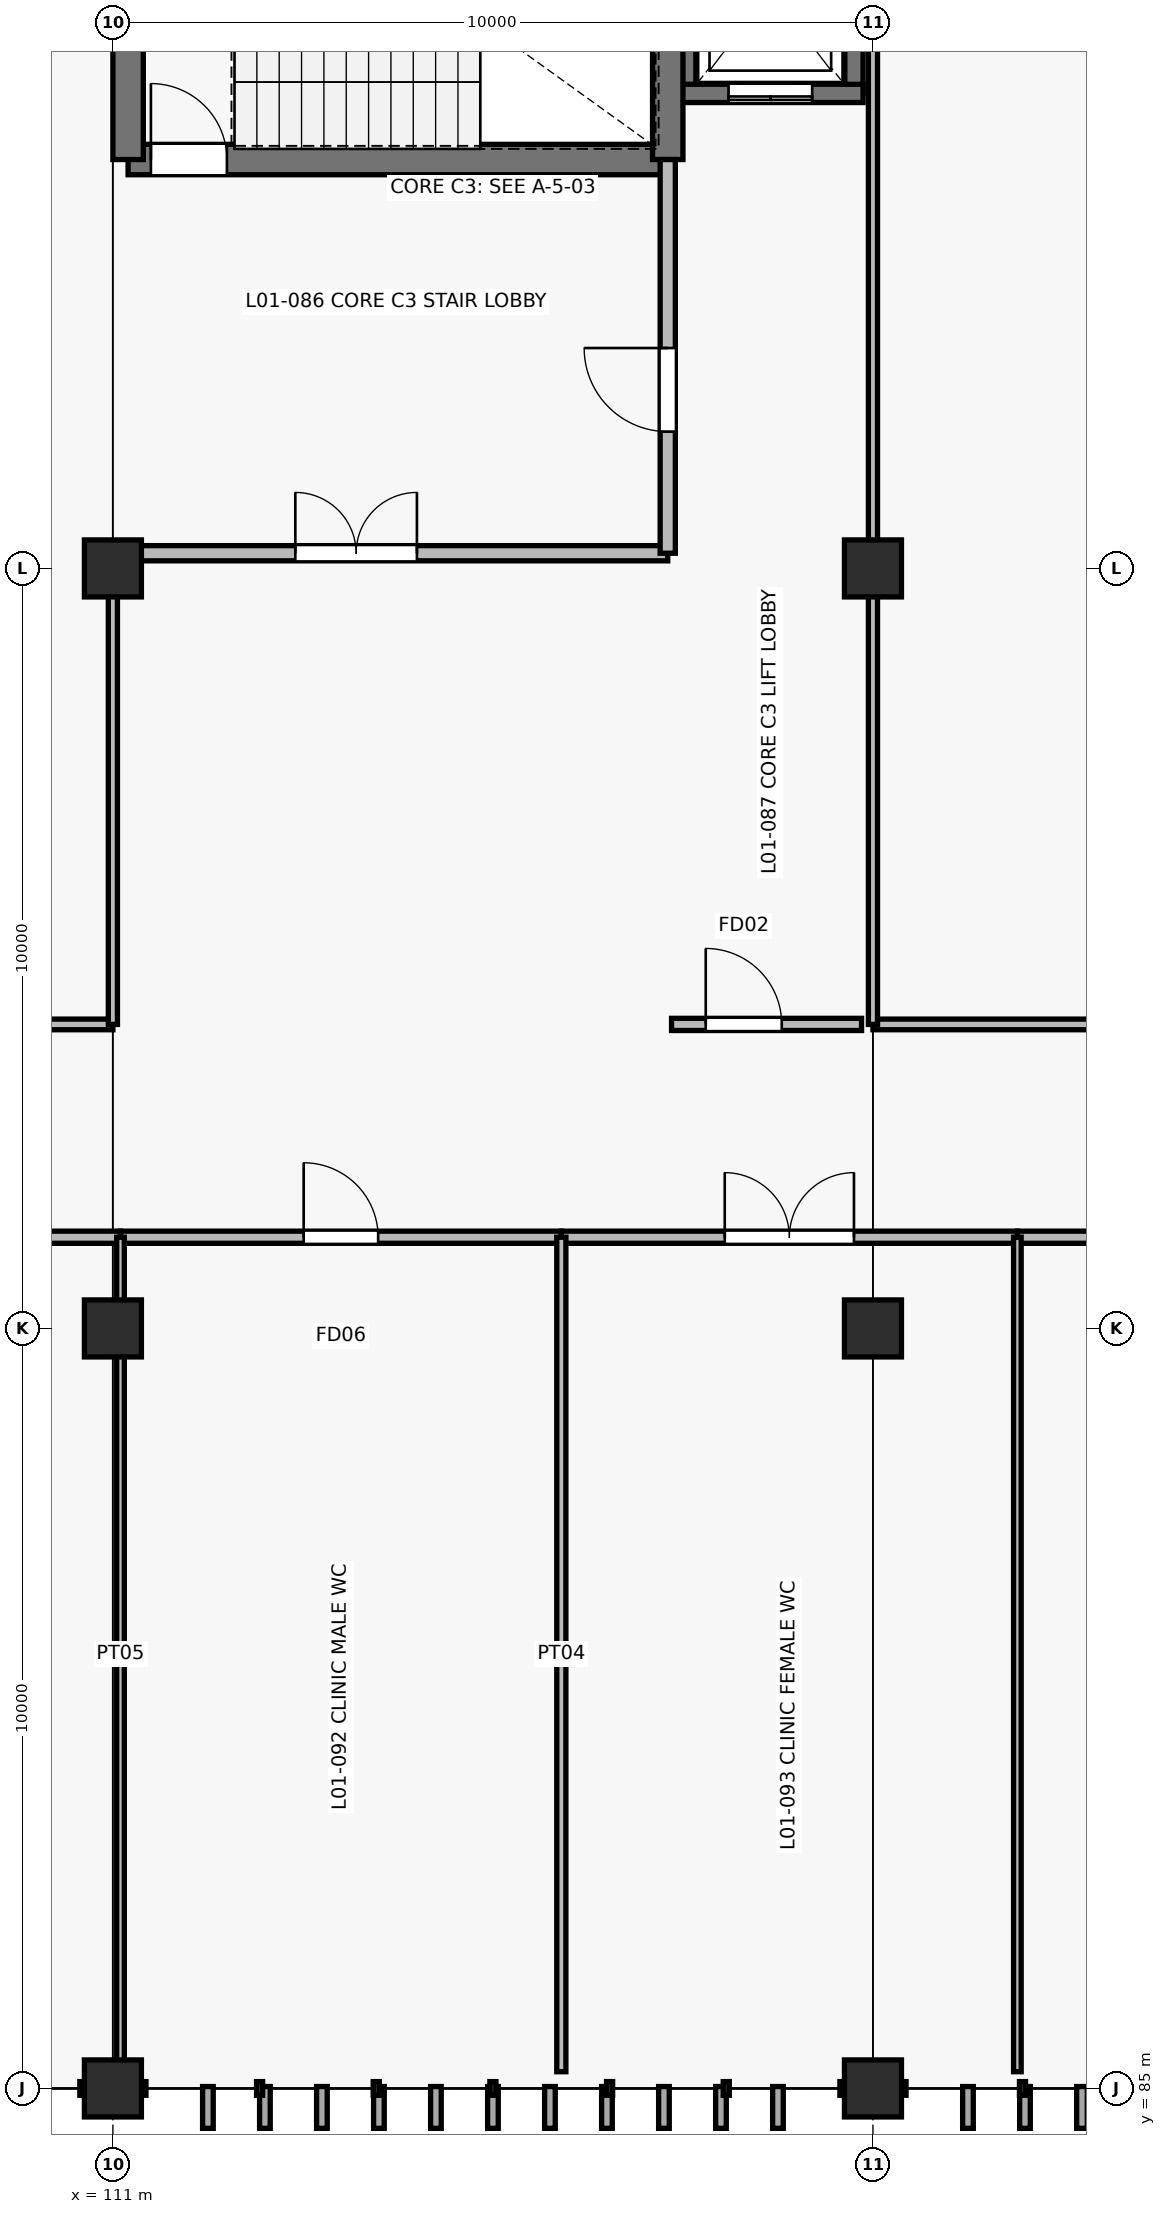
"""IFC4 building model, lengths in metres.
Left out: names, types, materials, properties, quantities, classifications, styles, units other than length and angle.
Written with IfcOpenShell. Run it as: python <this file> out.ifc"""

import sys

from ifc_helpers import new_model, si_unit, direction, frame, frame_2d, origin, origin_2d, place, context, subcontext, project, spatial, rectangle, extrude, element, fill, save


model = new_model("IFC4")
c1 = context("Model", 3, precision=1e-05, world=origin(), true_north=direction((0.0, 1.0)))
c2 = subcontext(c1, "Body", "Model", "MODEL_VIEW")
j1 = project(units=[si_unit("LENGTHUNIT", "METRE"), si_unit("PLANEANGLEUNIT", "RADIAN")], contexts=[c1])
p1 = place(None, origin())
s1 = spatial("IfcSite", under=j1, at=p1, CompositionType="ELEMENT")
p2 = place(p1, origin())
s2 = spatial("IfcBuilding", under=s1, at=p2, CompositionType="ELEMENT")
p3 = place(p2, frame((0.0, 0.0, 4.8)))
s3 = spatial("IfcBuildingStorey", under=s2, at=p3, CompositionType="ELEMENT", Elevation=4.8)
for number, where, z_axis, x_axis in (
    (1, (111.0, 85.0, 0.0), (0.0, 0.0, 1.0), (1.0, 0.0, 0.0)),
    (2, (111.0, 95.0, 0.0), (0.0, 0.0, 1.0), (1.0, 0.0, 0.0)),
    (3, (111.0, 105.0, 0.0), (0.0, 0.0, 1.0), (1.0, 0.0, 0.0)),
    (4, (121.0, 85.0, 0.0), (0.0, 0.0, 1.0), (1.0, 0.0, 0.0)),
    (5, (121.0, 95.0, 0.0), (0.0, 0.0, 1.0), (1.0, 0.0, 0.0)),
    (6, (121.0, 105.0, 0.0), (0.0, 0.0, 1.0), (1.0, 0.0, 0.0)),
):
    element("IfcColumn", number, at=place(p3, frame(where, z_axis=z_axis, x_axis=x_axis)), inside=s3, PredefinedType="COLUMN", context=c2, shape_type="SweptSolid", body=[
        extrude(rectangle(XDim=0.75, YDim=0.75, at=origin_2d()), origin(), (0.0, 0.0, 1.0), 4.2),
    ])
for number, where, z_axis, x_axis in (
    (7, (118.55, 111.25, 0.0), (0.0, 0.0, 1.0), (0.0, 1.0, 0.0)),
    (8, (120.75, 113.95, 0.0), (0.0, 0.0, 1.0), (0.0, -1.0, 0.0)),
):
    element("IfcWall", number, at=place(p3, frame(where, z_axis=z_axis, x_axis=x_axis)), inside=s3, PredefinedType="SHEAR", context=c2, shape_type="SweptSolid", body=[
        extrude(rectangle(XDim=2.7, YDim=0.24, at=frame_2d((1.35, 0.0))), origin(), (0.0, 0.0, 1.0), 4.2),
    ])
p4 = place(p3, frame((120.87, 111.25, 0.0), z_axis=(0.0, 0.0, 1.0), x_axis=(-1.0, 0.0, 0.0)))
e9 = element("IfcWall", 9, at=p4, inside=s3, PredefinedType="SHEAR", context=c2, shape_type="SweptSolid", body=[
    extrude(rectangle(XDim=2.44, YDim=0.24, at=frame_2d((1.22, 0.0))), origin(), (0.0, 0.0, 1.0), 4.2),
])
p5 = place(p4, frame((0.67, 0.0, 0.0)))
e10 = element("IfcOpeningElement", 10, at=p5, cuts=e9, PredefinedType="OPENING", context=c2, shape_type="SweptSolid", body=[
    extrude(rectangle(XDim=1.1, YDim=2.15, at=frame_2d((0.55, 1.075))), frame((0.0, 0.13, 0.0), z_axis=(0.0, -1.0, 0.0), x_axis=(1.0, 0.0, 0.0)), (0.0, 0.0, 1.0), 0.26),
])
p6 = place(p3, frame((111.2, 110.38, 0.0), z_axis=(0.0, 0.0, 1.0), x_axis=(1.0, 0.0, 0.0)))
e11 = element("IfcWall", 11, at=p6, inside=s3, PredefinedType="SHEAR", context=c2, shape_type="SweptSolid", body=[
    extrude(rectangle(XDim=7.1, YDim=0.4, at=frame_2d((3.55, 0.0))), origin(), (0.0, 0.0, 1.0), 4.2),
])
p7 = place(p6, frame((0.3, 0.0, 0.0)))
e12 = element("IfcOpeningElement", 12, at=p7, cuts=e11, PredefinedType="OPENING", context=c2, shape_type="SweptSolid", body=[
    extrude(rectangle(XDim=1.0, YDim=2.15, at=frame_2d((0.5, 1.075))), frame((0.0, 0.21, 0.0), z_axis=(0.0, -1.0, 0.0), x_axis=(1.0, 0.0, 0.0)), (0.0, 0.0, 1.0), 0.42),
])
for number, where, z_axis, x_axis in (
    (13, (118.3, 110.38, 0.0), (0.0, 0.0, 1.0), (0.0, 1.0, 0.0)),
    (14, (111.2, 114.62, 0.0), (0.0, 0.0, 1.0), (0.0, -1.0, 0.0)),
):
    element("IfcWall", number, at=place(p3, frame(where, z_axis=z_axis, x_axis=x_axis)), inside=s3, PredefinedType="SHEAR", context=c2, shape_type="SweptSolid", body=[
        extrude(rectangle(XDim=4.24, YDim=0.4, at=frame_2d((2.12, 0.0))), origin(), (0.0, 0.0, 1.0), 4.2),
    ])
p8 = place(p3, frame((111.2, 105.2, 0.0), z_axis=(0.0, 0.0, 1.0), x_axis=(1.0, 0.0, 0.0)))
e15 = element("IfcWall", 15, at=p8, inside=s3, PredefinedType="PARTITIONING", context=c2, shape_type="SweptSolid", body=[
    extrude(rectangle(XDim=7.1, YDim=0.2, at=frame_2d((3.55, 0.0))), origin(), (0.0, 0.0, 1.0), 2.925),
])
p9 = place(p8, frame((2.2, 0.0, 0.0)))
e16 = element("IfcOpeningElement", 16, at=p9, cuts=e15, PredefinedType="OPENING", context=c2, shape_type="SweptSolid", body=[
    extrude(rectangle(XDim=1.6, YDim=2.2, at=frame_2d((0.8, 1.1))), frame((0.0, 0.11, 0.0), z_axis=(0.0, -1.0, 0.0), x_axis=(1.0, 0.0, 0.0)), (0.0, 0.0, 1.0), 0.22),
])
p10 = place(p3, frame((118.3, 105.2, 0.0), z_axis=(0.0, 0.0, 1.0), x_axis=(0.0, 1.0, 0.0)))
e17 = element("IfcWall", 17, at=p10, inside=s3, PredefinedType="PARTITIONING", context=c2, shape_type="SweptSolid", body=[
    extrude(rectangle(XDim=5.18, YDim=0.2, at=frame_2d((2.59, 0.0))), origin(), (0.0, 0.0, 1.0), 3.025),
])
p11 = place(p10, frame((1.6, 0.0, 0.0)))
e18 = element("IfcOpeningElement", 18, at=p11, cuts=e17, PredefinedType="OPENING", context=c2, shape_type="SweptSolid", body=[
    extrude(rectangle(XDim=1.1, YDim=2.15, at=frame_2d((0.55, 1.075))), frame((0.0, 0.11, 0.0), z_axis=(0.0, -1.0, 0.0), x_axis=(1.0, 0.0, 0.0)), (0.0, 0.0, 1.0), 0.22),
])
p12 = place(p3, frame((118.35, 99.0, 0.0), z_axis=(0.0, 0.0, 1.0), x_axis=(1.0, 0.0, 0.0)))
e19 = element("IfcWall", 19, at=p12, inside=s3, PredefinedType="PARTITIONING", context=c2, shape_type="SweptSolid", body=[
    extrude(rectangle(XDim=2.5, YDim=0.16, at=frame_2d((1.25, 0.0))), origin(), (0.0, 0.0, 1.0), 2.925),
])
p13 = place(p12, frame((0.45, 0.0, 0.0)))
e20 = element("IfcOpeningElement", 20, at=p13, cuts=e19, PredefinedType="OPENING", context=c2, shape_type="SweptSolid", body=[
    extrude(rectangle(XDim=1.0, YDim=2.15, at=frame_2d((0.5, 1.075))), frame((0.0, 0.09, 0.0), z_axis=(0.0, -1.0, 0.0), x_axis=(1.0, 0.0, 0.0)), (0.0, 0.0, 1.0), 0.18),
])
p14 = place(p3, frame((91.1, 96.2, 0.0), z_axis=(0.0, 0.0, 1.0), x_axis=(1.0, 0.0, 0.0)))
e21 = element("IfcWall", 21, at=p14, inside=s3, PredefinedType="PARTITIONING", context=c2, shape_type="SweptSolid", body=[
    extrude(rectangle(XDim=20.0, YDim=0.16, at=frame_2d((10.0, 0.0))), origin(), (0.0, 0.0, 1.0), 2.925),
])
p15 = place(p14, frame((12.05, 0.0, 0.0)))
e22 = element("IfcOpeningElement", 22, at=p15, cuts=e21, PredefinedType="OPENING", context=c2, shape_type="SweptSolid", body=[
    extrude(rectangle(XDim=1.5, YDim=2.2, at=frame_2d((0.75, 1.1))), frame((0.0, 0.09, 0.0), z_axis=(0.0, -1.0, 0.0), x_axis=(1.0, 0.0, 0.0)), (0.0, 0.0, 1.0), 0.18),
])
p16 = place(p3, frame((111.1, 96.2, 0.0), z_axis=(0.0, 0.0, 1.0), x_axis=(1.0, 0.0, 0.0)))
e23 = element("IfcWall", 23, at=p16, inside=s3, PredefinedType="PARTITIONING", context=c2, shape_type="SweptSolid", body=[
    extrude(rectangle(XDim=5.8, YDim=0.16, at=frame_2d((2.9, 0.0))), origin(), (0.0, 0.0, 1.0), 2.925),
])
p17 = place(p16, frame((2.41, 0.0, 0.0)))
e24 = element("IfcOpeningElement", 24, at=p17, cuts=e23, PredefinedType="OPENING", context=c2, shape_type="SweptSolid", body=[
    extrude(rectangle(XDim=0.98, YDim=2.1, at=frame_2d((0.49, 1.05))), frame((0.0, 0.09, 0.0), z_axis=(0.0, -1.0, 0.0), x_axis=(1.0, 0.0, 0.0)), (0.0, 0.0, 1.0), 0.18),
])
p18 = place(p3, frame((111.1, 85.22, 0.0), z_axis=(0.0, 0.0, 1.0), x_axis=(0.0, 1.0, 0.0)))
e25 = element("IfcWall", 25, at=p18, inside=s3, PredefinedType="PARTITIONING", context=c2, shape_type="SweptSolid", body=[
    extrude(rectangle(XDim=10.98, YDim=0.1, at=frame_2d((5.49, 0.0))), origin(), (0.0, 0.0, 1.0), 2.925),
])
p19 = place(p3, frame((116.9, 96.2, 0.0), z_axis=(0.0, 0.0, 1.0), x_axis=(1.0, 0.0, 0.0)))
e26 = element("IfcWall", 26, at=p19, inside=s3, PredefinedType="PARTITIONING", context=c2, shape_type="SweptSolid", body=[
    extrude(rectangle(XDim=6.0, YDim=0.16, at=frame_2d((3.0, 0.0))), origin(), (0.0, 0.0, 1.0), 2.925),
])
p20 = place(p19, frame((2.15, 0.0, 0.0)))
e27 = element("IfcOpeningElement", 27, at=p20, cuts=e26, PredefinedType="OPENING", context=c2, shape_type="SweptSolid", body=[
    extrude(rectangle(XDim=1.7, YDim=2.25, at=frame_2d((0.85, 1.125))), frame((0.0, 0.09, 0.0), z_axis=(0.0, -1.0, 0.0), x_axis=(1.0, 0.0, 0.0)), (0.0, 0.0, 1.0), 0.18),
])
p21 = place(p3, frame((116.9, 85.22, 0.0), z_axis=(0.0, 0.0, 1.0), x_axis=(0.0, 1.0, 0.0)))
e28 = element("IfcWall", 28, at=p21, inside=s3, PredefinedType="PARTITIONING", context=c2, shape_type="SweptSolid", body=[
    extrude(rectangle(XDim=10.98, YDim=0.12, at=frame_2d((5.49, 0.0))), origin(), (0.0, 0.0, 1.0), 3.025),
])
p22 = place(p3, frame((122.9, 96.2, 0.0), z_axis=(0.0, 0.0, 1.0), x_axis=(1.0, 0.0, 0.0)))
e29 = element("IfcWall", 29, at=p22, inside=s3, PredefinedType="PARTITIONING", context=c2, shape_type="SweptSolid", body=[
    extrude(rectangle(XDim=7.92, YDim=0.16, at=frame_2d((3.96, 0.0))), origin(), (0.0, 0.0, 1.0), 2.925),
])
p23 = place(p22, frame((3.31, 0.0, 0.0)))
e30 = element("IfcOpeningElement", 30, at=p23, cuts=e29, PredefinedType="OPENING", context=c2, shape_type="SweptSolid", body=[
    extrude(rectangle(XDim=1.3, YDim=2.2, at=frame_2d((0.65, 1.1))), frame((0.0, 0.09, 0.0), z_axis=(0.0, -1.0, 0.0), x_axis=(1.0, 0.0, 0.0)), (0.0, 0.0, 1.0), 0.18),
])
p24 = place(p3, frame((122.9, 85.22, 0.0), z_axis=(0.0, 0.0, 1.0), x_axis=(0.0, 1.0, 0.0)))
e31 = element("IfcWall", 31, at=p24, inside=s3, PredefinedType="PARTITIONING", context=c2, shape_type="SweptSolid", body=[
    extrude(rectangle(XDim=10.98, YDim=0.1, at=frame_2d((5.49, 0.0))), origin(), (0.0, 0.0, 1.0), 3.025),
])
p25 = place(p3, frame((101.0, 99.0, 0.0), z_axis=(0.0, 0.0, 1.0), x_axis=(1.0, 0.0, 0.0)))
e32 = element("IfcWall", 32, at=p25, inside=s3, PredefinedType="PARTITIONING", context=c2, shape_type="SweptSolid", body=[
    extrude(rectangle(XDim=10.0, YDim=0.14, at=frame_2d((5.0, 0.0))), origin(), (0.0, 0.0, 1.0), 2.925),
])
p26 = place(p25, frame((4.475, 0.0, 0.0)))
e33 = element("IfcOpeningElement", 33, at=p26, cuts=e32, PredefinedType="OPENING", context=c2, shape_type="SweptSolid", body=[
    extrude(rectangle(XDim=1.05, YDim=2.1, at=frame_2d((0.525, 1.05))), frame((0.0, 0.08, 0.0), z_axis=(0.0, -1.0, 0.0), x_axis=(1.0, 0.0, 0.0)), (0.0, 0.0, 1.0), 0.16),
])
p27 = place(p3, frame((111.0, 99.0, 0.0), z_axis=(0.0, 0.0, 1.0), x_axis=(0.0, 1.0, 0.0)))
e34 = element("IfcWall", 34, at=p27, inside=s3, PredefinedType="PARTITIONING", context=c2, shape_type="SweptSolid", body=[
    extrude(rectangle(XDim=6.2, YDim=0.12, at=frame_2d((3.1, 0.0))), origin(), (0.0, 0.0, 1.0), 2.925),
])
p28 = place(p3, frame((121.0, 99.0, 0.0), z_axis=(0.0, 0.0, 1.0), x_axis=(1.0, 0.0, 0.0)))
e35 = element("IfcWall", 35, at=p28, inside=s3, PredefinedType="PARTITIONING", context=c2, shape_type="SweptSolid", body=[
    extrude(rectangle(XDim=16.0, YDim=0.14, at=frame_2d((8.0, 0.0))), origin(), (0.0, 0.0, 1.0), 2.925),
])
p29 = place(p28, frame((7.425, 0.0, 0.0)))
e36 = element("IfcOpeningElement", 36, at=p29, cuts=e35, PredefinedType="OPENING", context=c2, shape_type="SweptSolid", body=[
    extrude(rectangle(XDim=1.15, YDim=2.15, at=frame_2d((0.575, 1.075))), frame((0.0, 0.08, 0.0), z_axis=(0.0, -1.0, 0.0), x_axis=(1.0, 0.0, 0.0)), (0.0, 0.0, 1.0), 0.16),
])
p30 = place(p3, frame((121.0, 99.0, 0.0), z_axis=(0.0, 0.0, 1.0), x_axis=(0.0, 1.0, 0.0)))
e37 = element("IfcWall", 37, at=p30, inside=s3, PredefinedType="PARTITIONING", context=c2, shape_type="SweptSolid", body=[
    extrude(rectangle(XDim=15.75, YDim=0.12, at=frame_2d((7.875, 0.0))), origin(), (0.0, 0.0, 1.0), 2.925),
])
p31 = place(p5, origin())
e38 = element("IfcDoor", 38, at=p31, inside=s3, OperationType="DOUBLE_DOOR_SLIDING", PredefinedType="USERDEFINED", context=c2, shape_type="SweptSolid", body=[
    extrude(rectangle(XDim=1.1, YDim=2.15, at=frame_2d((0.55, 1.075))), frame((0.0, 0.025, 0.0), z_axis=(0.0, -1.0, 0.0), x_axis=(1.0, 0.0, 0.0)), (0.0, 0.0, 1.0), 0.05),
])
fill(e10, e38)
p32 = place(p7, origin())
e39 = element("IfcDoor", 39, at=p32, inside=s3, OperationType="SINGLE_SWING_LEFT", PredefinedType="DOOR", context=c2, shape_type="SweptSolid", body=[
    extrude(rectangle(XDim=1.0, YDim=2.15, at=frame_2d((0.5, 1.075))), frame((0.0, 0.025, 0.0), z_axis=(0.0, -1.0, 0.0), x_axis=(1.0, 0.0, 0.0)), (0.0, 0.0, 1.0), 0.05),
])
fill(e12, e39)
p33 = place(p9, origin())
e40 = element("IfcDoor", 40, at=p33, inside=s3, OperationType="DOUBLE_DOOR_SINGLE_SWING", PredefinedType="DOOR", context=c2, shape_type="SweptSolid", body=[
    extrude(rectangle(XDim=1.6, YDim=2.2, at=frame_2d((0.8, 1.1))), frame((0.0, 0.025, 0.0), z_axis=(0.0, -1.0, 0.0), x_axis=(1.0, 0.0, 0.0)), (0.0, 0.0, 1.0), 0.05),
])
fill(e16, e40)
p34 = place(p11, origin())
e41 = element("IfcDoor", 41, at=p34, inside=s3, OperationType="SINGLE_SWING_RIGHT", PredefinedType="DOOR", context=c2, shape_type="SweptSolid", body=[
    extrude(rectangle(XDim=1.1, YDim=2.15, at=frame_2d((0.55, 1.075))), frame((0.0, 0.025, 0.0), z_axis=(0.0, -1.0, 0.0), x_axis=(1.0, 0.0, 0.0)), (0.0, 0.0, 1.0), 0.05),
])
fill(e18, e41)
p35 = place(p13, origin())
e42 = element("IfcDoor", 42, at=p35, inside=s3, OperationType="SINGLE_SWING_LEFT", PredefinedType="DOOR", context=c2, shape_type="SweptSolid", body=[
    extrude(rectangle(XDim=1.0, YDim=2.15, at=frame_2d((0.5, 1.075))), frame((0.0, 0.025, 0.0), z_axis=(0.0, -1.0, 0.0), x_axis=(1.0, 0.0, 0.0)), (0.0, 0.0, 1.0), 0.05),
])
fill(e20, e42)
p36 = place(p17, origin())
e43 = element("IfcDoor", 43, at=p36, inside=s3, OperationType="SINGLE_SWING_LEFT", PredefinedType="DOOR", context=c2, shape_type="SweptSolid", body=[
    extrude(rectangle(XDim=0.98, YDim=2.1, at=frame_2d((0.49, 1.05))), frame((0.0, 0.025, 0.0), z_axis=(0.0, -1.0, 0.0), x_axis=(1.0, 0.0, 0.0)), (0.0, 0.0, 1.0), 0.05),
])
fill(e24, e43)
p37 = place(p20, origin())
e44 = element("IfcDoor", 44, at=p37, inside=s3, OperationType="DOUBLE_DOOR_SINGLE_SWING", PredefinedType="DOOR", context=c2, shape_type="SweptSolid", body=[
    extrude(rectangle(XDim=1.7, YDim=2.25, at=frame_2d((0.85, 1.125))), frame((0.0, 0.025, 0.0), z_axis=(0.0, -1.0, 0.0), x_axis=(1.0, 0.0, 0.0)), (0.0, 0.0, 1.0), 0.05),
])
fill(e27, e44)
save(model, sys.argv[1])
